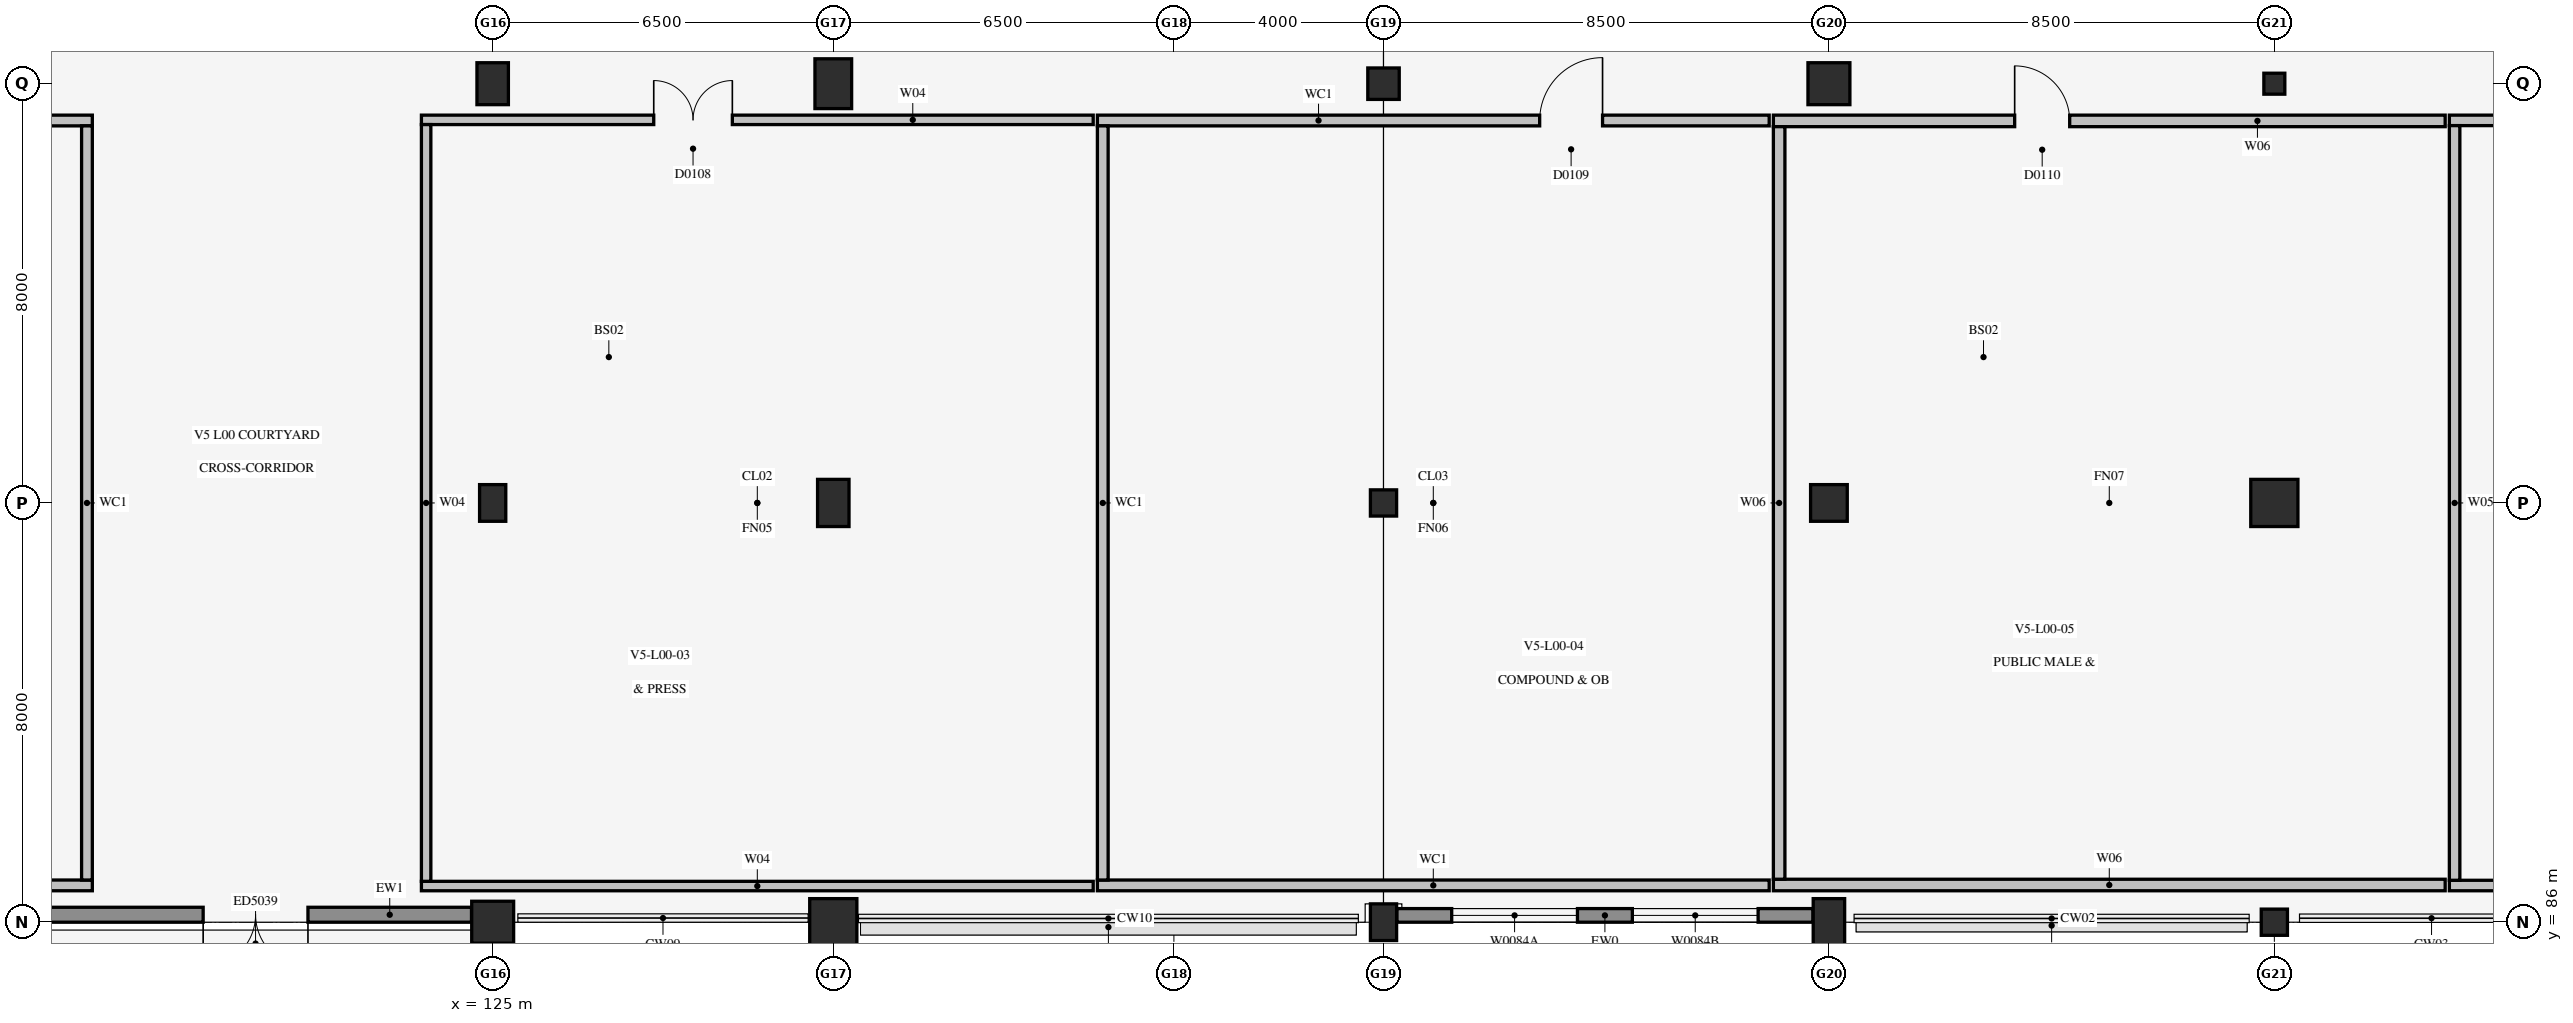
"""IFC4 building model, lengths in metres.
Left out: names, types, materials, properties, quantities, classifications, styles, units other than length and angle.
Written with IfcOpenShell. Run it as: python <this file> out.ifc"""

import sys

from ifc_helpers import new_model, si_unit, direction, frame, frame_2d, origin, origin_2d, place, context, subcontext, project, spatial, rectangle, circle, extrude, element, fill, save


model = new_model("IFC4")
c1 = context("Model", 3, precision=1e-05, world=origin(), true_north=direction((0.0, 1.0)))
c2 = subcontext(c1, "Body", "Model", "MODEL_VIEW")
j1 = project(units=[si_unit("LENGTHUNIT", "METRE"), si_unit("PLANEANGLEUNIT", "RADIAN")], contexts=[c1])
p1 = place(None, origin())
s1 = spatial("IfcSite", under=j1, at=p1, CompositionType="ELEMENT")
p2 = place(p1, origin())
s2 = spatial("IfcBuilding", under=s1, at=p2, CompositionType="ELEMENT")
p3 = place(p2, origin())
s3 = spatial("IfcBuildingStorey", under=s2, at=p3, CompositionType="ELEMENT", Elevation=0.0)
p4 = place(p3, frame((125.0, 86.0, 0.0), z_axis=(0.0, 0.0, 1.0), x_axis=(1.0, 0.0, 0.0)))
e1 = element("IfcColumn", 1, at=p4, inside=s3, PredefinedType="COLUMN", context=c2, shape_type="SweptSolid", body=[
    extrude(rectangle(XDim=0.8, YDim=0.8, at=origin_2d()), origin(), (0.0, 0.0, 1.0), 5.4),
])
p5 = place(p3, frame((125.0, 94.0, 0.0), z_axis=(0.0, 0.0, 1.0), x_axis=(1.0, 0.0, 0.0)))
e2 = element("IfcColumn", 2, at=p5, inside=s3, PredefinedType="COLUMN", context=c2, shape_type="SweptSolid", body=[
    extrude(rectangle(XDim=0.5, YDim=0.7, at=origin_2d()), origin(), (0.0, 0.0, 1.0), 5.4),
])
p6 = place(p3, frame((125.0, 102.0, 0.0), z_axis=(0.0, 0.0, 1.0), x_axis=(1.0, 0.0, 0.0)))
e3 = element("IfcColumn", 3, at=p6, inside=s3, PredefinedType="COLUMN", context=c2, shape_type="SweptSolid", body=[
    extrude(rectangle(XDim=0.6, YDim=0.8, at=origin_2d()), origin(), (0.0, 0.0, 1.0), 5.4),
])
p7 = place(p3, frame((131.5, 86.0, 0.0), z_axis=(0.0, 0.0, 1.0), x_axis=(1.0, 0.0, 0.0)))
e4 = element("IfcColumn", 4, at=p7, inside=s3, PredefinedType="COLUMN", context=c2, shape_type="SweptSolid", body=[
    extrude(rectangle(XDim=0.9, YDim=0.9, at=origin_2d()), origin(), (0.0, 0.0, 1.0), 5.4),
])
p8 = place(p3, frame((131.5, 94.0, 0.0), z_axis=(0.0, 0.0, 1.0), x_axis=(1.0, 0.0, 0.0)))
e5 = element("IfcColumn", 5, at=p8, inside=s3, PredefinedType="COLUMN", context=c2, shape_type="SweptSolid", body=[
    extrude(rectangle(XDim=0.6, YDim=0.9, at=origin_2d()), origin(), (0.0, 0.0, 1.0), 5.4),
])
p9 = place(p3, frame((131.5, 102.0, 0.0), z_axis=(0.0, 0.0, 1.0), x_axis=(1.0, 0.0, 0.0)))
e6 = element("IfcColumn", 6, at=p9, inside=s3, PredefinedType="COLUMN", context=c2, shape_type="SweptSolid", body=[
    extrude(rectangle(XDim=0.7, YDim=0.95, at=origin_2d()), origin(), (0.0, 0.0, 1.0), 5.4),
])
p10 = place(p3, frame((142.0, 86.0, 0.0), z_axis=(0.0, 0.0, 1.0), x_axis=(1.0, 0.0, 0.0)))
e7 = element("IfcColumn", 7, at=p10, inside=s3, PredefinedType="COLUMN", context=c2, shape_type="SweptSolid", body=[
    extrude(rectangle(XDim=0.5, YDim=0.7, at=origin_2d()), origin(), (0.0, 0.0, 1.0), 5.4),
])
p11 = place(p3, frame((142.0, 94.0, 0.0), z_axis=(0.0, 0.0, 1.0), x_axis=(1.0, 0.0, 0.0)))
e8 = element("IfcColumn", 8, at=p11, inside=s3, PredefinedType="COLUMN", context=c2, shape_type="SweptSolid", body=[
    extrude(circle(Radius=0.25, at=origin_2d()), origin(), (0.0, 0.0, 1.0), 5.4),
])
p12 = place(p3, frame((142.0, 102.0, 0.0), z_axis=(0.0, 0.0, 1.0), x_axis=(1.0, 0.0, 0.0)))
e9 = element("IfcColumn", 9, at=p12, inside=s3, PredefinedType="COLUMN", context=c2, shape_type="SweptSolid", body=[
    extrude(circle(Radius=0.3, at=origin_2d()), origin(), (0.0, 0.0, 1.0), 5.4),
])
p13 = place(p3, frame((150.5, 86.0, 0.0), z_axis=(0.0, 0.0, 1.0), x_axis=(1.0, 0.0, 0.0)))
e10 = element("IfcColumn", 10, at=p13, inside=s3, PredefinedType="COLUMN", context=c2, shape_type="SweptSolid", body=[
    extrude(rectangle(XDim=0.6, YDim=0.9, at=origin_2d()), origin(), (0.0, 0.0, 1.0), 5.4),
])
p14 = place(p3, frame((150.5, 94.0, 0.0), z_axis=(0.0, 0.0, 1.0), x_axis=(1.0, 0.0, 0.0)))
e11 = element("IfcColumn", 11, at=p14, inside=s3, PredefinedType="COLUMN", context=c2, shape_type="SweptSolid", body=[
    extrude(circle(Radius=0.35, at=origin_2d()), origin(), (0.0, 0.0, 1.0), 5.4),
])
p15 = place(p3, frame((150.5, 102.0, 0.0), z_axis=(0.0, 0.0, 1.0), x_axis=(1.0, 0.0, 0.0)))
e12 = element("IfcColumn", 12, at=p15, inside=s3, PredefinedType="COLUMN", context=c2, shape_type="SweptSolid", body=[
    extrude(circle(Radius=0.4, at=origin_2d()), origin(), (0.0, 0.0, 1.0), 5.4),
])
p16 = place(p3, frame((159.0, 86.0, 0.0), z_axis=(0.0, 0.0, 1.0), x_axis=(1.0, 0.0, 0.0)))
e13 = element("IfcColumn", 13, at=p16, inside=s3, PredefinedType="COLUMN", context=c2, shape_type="SweptSolid", body=[
    extrude(circle(Radius=0.25, at=origin_2d()), origin(), (0.0, 0.0, 1.0), 5.4),
])
p17 = place(p3, frame((159.0, 94.0, 0.0), z_axis=(0.0, 0.0, 1.0), x_axis=(1.0, 0.0, 0.0)))
e14 = element("IfcColumn", 14, at=p17, inside=s3, PredefinedType="COLUMN", context=c2, shape_type="SweptSolid", body=[
    extrude(circle(Radius=0.45, at=origin_2d()), origin(), (0.0, 0.0, 1.0), 5.4),
])
p18 = place(p3, frame((159.0, 102.0, 0.0), z_axis=(0.0, 0.0, 1.0), x_axis=(1.0, 0.0, 0.0)))
e15 = element("IfcColumn", 15, at=p18, inside=s3, PredefinedType="COLUMN", context=c2, shape_type="SweptSolid", body=[
    extrude(rectangle(XDim=0.4, YDim=0.4, at=origin_2d()), origin(), (0.0, 0.0, 1.0), 5.4),
])
p19 = place(p3, frame((108.14, 86.702, 0.0), z_axis=(0.0, 0.0, 1.0), x_axis=(1.0, 0.0, 0.0)))
e16 = element("IfcWall", 16, at=p19, inside=s3, PredefinedType="SOLIDWALL", context=c2, shape_type="SweptSolid", body=[
    extrude(rectangle(XDim=9.22, YDim=0.205, at=frame_2d((4.61, 0.0))), origin(), (0.0, 0.0, 1.0), 5.125),
])
p20 = place(p3, frame((108.14, 101.298, 0.0), z_axis=(0.0, 0.0, 1.0), x_axis=(1.0, 0.0, 0.0)))
e17 = element("IfcWall", 17, at=p20, inside=s3, PredefinedType="SOLIDWALL", context=c2, shape_type="SweptSolid", body=[
    extrude(rectangle(XDim=9.22, YDim=0.205, at=frame_2d((4.61, 0.0))), origin(), (0.0, 0.0, 1.0), 5.125),
])
p21 = place(p20, frame((3.256, 0.0, 0.0)))
e18 = element("IfcOpeningElement", 18, at=p21, cuts=e17, PredefinedType="OPENING", context=c2, shape_type="SweptSolid", body=[
    extrude(rectangle(XDim=1.0, YDim=2.2, at=frame_2d((0.5, 1.1))), frame((0.0, 0.115, 0.0), z_axis=(0.0, -1.0, 0.0), x_axis=(1.0, 0.0, 0.0)), (0.0, 0.0, 1.0), 0.229),
])
p22 = place(p3, frame((117.258, 86.805, 0.0), z_axis=(0.0, 0.0, 1.0), x_axis=(0.0, 1.0, 0.0)))
e19 = element("IfcWall", 19, at=p22, inside=s3, PredefinedType="SOLIDWALL", context=c2, shape_type="SweptSolid", body=[
    extrude(rectangle(XDim=14.39, YDim=0.205, at=frame_2d((7.195, 0.0))), origin(), (0.0, 0.0, 1.0), 5.125),
])
p23 = place(p3, frame((123.64, 86.69, 0.0), z_axis=(0.0, 0.0, 1.0), x_axis=(1.0, 0.0, 0.0)))
e20 = element("IfcWall", 20, at=p23, inside=s3, PredefinedType="PARTITIONING", context=c2, shape_type="SweptSolid", body=[
    extrude(rectangle(XDim=12.82, YDim=0.18, at=frame_2d((6.41, 0.0))), origin(), (0.0, 0.0, 1.0), 5.125),
])
p24 = place(p3, frame((123.64, 101.31, 0.0), z_axis=(0.0, 0.0, 1.0), x_axis=(1.0, 0.0, 0.0)))
e21 = element("IfcWall", 21, at=p24, inside=s3, PredefinedType="PARTITIONING", context=c2, shape_type="SweptSolid", body=[
    extrude(rectangle(XDim=12.82, YDim=0.18, at=frame_2d((6.41, 0.0))), origin(), (0.0, 0.0, 1.0), 5.125),
])
p25 = place(p24, frame((4.434, 0.0, 0.0)))
e22 = element("IfcOpeningElement", 22, at=p25, cuts=e21, PredefinedType="OPENING", context=c2, shape_type="SweptSolid", body=[
    extrude(rectangle(XDim=1.5, YDim=2.3, at=frame_2d((0.75, 1.15))), frame((0.0, 0.102, 0.0), z_axis=(0.0, -1.0, 0.0), x_axis=(1.0, 0.0, 0.0)), (0.0, 0.0, 1.0), 0.204),
])
p26 = place(p3, frame((123.73, 86.78, 0.0), z_axis=(0.0, 0.0, 1.0), x_axis=(0.0, 1.0, 0.0)))
e23 = element("IfcWall", 23, at=p26, inside=s3, PredefinedType="PARTITIONING", context=c2, shape_type="SweptSolid", body=[
    extrude(rectangle(XDim=14.44, YDim=0.18, at=frame_2d((7.22, 0.0))), origin(), (0.0, 0.0, 1.0), 5.125),
])
p27 = place(p3, frame((136.54, 86.702, 0.0), z_axis=(0.0, 0.0, 1.0), x_axis=(1.0, 0.0, 0.0)))
e24 = element("IfcWall", 24, at=p27, inside=s3, PredefinedType="SOLIDWALL", context=c2, shape_type="SweptSolid", body=[
    extrude(rectangle(XDim=12.82, YDim=0.205, at=frame_2d((6.41, 0.0))), origin(), (0.0, 0.0, 1.0), 5.125),
])
p28 = place(p3, frame((136.54, 101.298, 0.0), z_axis=(0.0, 0.0, 1.0), x_axis=(1.0, 0.0, 0.0)))
e25 = element("IfcWall", 25, at=p28, inside=s3, PredefinedType="SOLIDWALL", context=c2, shape_type="SweptSolid", body=[
    extrude(rectangle(XDim=12.82, YDim=0.205, at=frame_2d((6.41, 0.0))), origin(), (0.0, 0.0, 1.0), 5.125),
])
p29 = place(p28, frame((8.44, 0.0, 0.0)))
e26 = element("IfcOpeningElement", 26, at=p29, cuts=e25, PredefinedType="OPENING", context=c2, shape_type="SweptSolid", body=[
    extrude(rectangle(XDim=1.2, YDim=2.2, at=frame_2d((0.6, 1.1))), frame((0.0, 0.115, 0.0), z_axis=(0.0, -1.0, 0.0), x_axis=(1.0, 0.0, 0.0)), (0.0, 0.0, 1.0), 0.229),
])
p30 = place(p3, frame((136.643, 86.805, 0.0), z_axis=(0.0, 0.0, 1.0), x_axis=(0.0, 1.0, 0.0)))
e27 = element("IfcWall", 27, at=p30, inside=s3, PredefinedType="SOLIDWALL", context=c2, shape_type="SweptSolid", body=[
    extrude(rectangle(XDim=14.39, YDim=0.205, at=frame_2d((7.195, 0.0))), origin(), (0.0, 0.0, 1.0), 5.125),
])
p31 = place(p3, frame((149.44, 86.71, 0.0), z_axis=(0.0, 0.0, 1.0), x_axis=(1.0, 0.0, 0.0)))
e28 = element("IfcWall", 28, at=p31, inside=s3, PredefinedType="PLUMBINGWALL", context=c2, shape_type="SweptSolid", body=[
    extrude(rectangle(XDim=12.82, YDim=0.22, at=frame_2d((6.41, 0.0))), origin(), (0.0, 0.0, 1.0), 5.125),
])
p32 = place(p3, frame((149.44, 101.29, 0.0), z_axis=(0.0, 0.0, 1.0), x_axis=(1.0, 0.0, 0.0)))
e29 = element("IfcWall", 29, at=p32, inside=s3, PredefinedType="PLUMBINGWALL", context=c2, shape_type="SweptSolid", body=[
    extrude(rectangle(XDim=12.82, YDim=0.22, at=frame_2d((6.41, 0.0))), origin(), (0.0, 0.0, 1.0), 5.125),
])
p33 = place(p32, frame((4.604, 0.0, 0.0)))
e30 = element("IfcOpeningElement", 30, at=p33, cuts=e29, PredefinedType="OPENING", context=c2, shape_type="SweptSolid", body=[
    extrude(rectangle(XDim=1.05, YDim=2.15, at=frame_2d((0.525, 1.075))), frame((0.0, 0.122, 0.0), z_axis=(0.0, -1.0, 0.0), x_axis=(1.0, 0.0, 0.0)), (0.0, 0.0, 1.0), 0.244),
])
p34 = place(p3, frame((149.55, 86.82, 0.0), z_axis=(0.0, 0.0, 1.0), x_axis=(0.0, 1.0, 0.0)))
e31 = element("IfcWall", 31, at=p34, inside=s3, PredefinedType="PLUMBINGWALL", context=c2, shape_type="SweptSolid", body=[
    extrude(rectangle(XDim=14.36, YDim=0.22, at=frame_2d((7.18, 0.0))), origin(), (0.0, 0.0, 1.0), 5.125),
])
p35 = place(p3, frame((162.34, 86.7, 0.0), z_axis=(0.0, 0.0, 1.0), x_axis=(1.0, 0.0, 0.0)))
e32 = element("IfcWall", 32, at=p35, inside=s3, PredefinedType="PLUMBINGWALL", context=c2, shape_type="SweptSolid", body=[
    extrude(rectangle(XDim=12.82, YDim=0.2, at=frame_2d((6.41, 0.0))), origin(), (0.0, 0.0, 1.0), 5.125),
])
p36 = place(p3, frame((162.34, 101.3, 0.0), z_axis=(0.0, 0.0, 1.0), x_axis=(1.0, 0.0, 0.0)))
e33 = element("IfcWall", 33, at=p36, inside=s3, PredefinedType="PLUMBINGWALL", context=c2, shape_type="SweptSolid", body=[
    extrude(rectangle(XDim=12.82, YDim=0.2, at=frame_2d((6.41, 0.0))), origin(), (0.0, 0.0, 1.0), 5.125),
])
p37 = place(p36, frame((7.258, 0.0, 0.0)))
e34 = element("IfcOpeningElement", 34, at=p37, cuts=e33, PredefinedType="OPENING", context=c2, shape_type="SweptSolid", body=[
    extrude(rectangle(XDim=0.9, YDim=2.1, at=frame_2d((0.45, 1.05))), frame((0.0, 0.112, 0.0), z_axis=(0.0, -1.0, 0.0), x_axis=(1.0, 0.0, 0.0)), (0.0, 0.0, 1.0), 0.224),
])
p38 = place(p3, frame((162.44, 86.8, 0.0), z_axis=(0.0, 0.0, 1.0), x_axis=(0.0, 1.0, 0.0)))
e35 = element("IfcWall", 35, at=p38, inside=s3, PredefinedType="PLUMBINGWALL", context=c2, shape_type="SweptSolid", body=[
    extrude(rectangle(XDim=14.4, YDim=0.2, at=frame_2d((7.2, 0.0))), origin(), (0.0, 0.0, 1.0), 5.125),
])
p39 = place(p3, frame((116.354, 86.143, 0.0), z_axis=(0.0, 0.0, 1.0), x_axis=(1.0, 0.0, 0.0)))
e36 = element("IfcWall", 36, at=p39, inside=s3, PredefinedType="SOLIDWALL", context=c2, shape_type="SweptSolid", body=[
    extrude(rectangle(XDim=8.242, YDim=0.285, at=frame_2d((4.121, 0.0))), origin(), (0.0, 0.0, 1.0), 4.498),
])
p40 = place(p39, frame((3.121, 0.0, 0.0)))
e37 = element("IfcOpeningElement", 37, at=p40, cuts=e36, PredefinedType="OPENING", context=c2, shape_type="SweptSolid", body=[
    extrude(rectangle(XDim=2.0, YDim=2.4, at=frame_2d((1.0, 1.2))), frame((0.0, 0.154, 0.0), z_axis=(0.0, -1.0, 0.0), x_axis=(1.0, 0.0, 0.0)), (0.0, 0.0, 1.0), 0.309),
])
p41 = place(p3, frame((142.254, 86.13, 0.0), z_axis=(0.0, 0.0, 1.0), x_axis=(1.0, 0.0, 0.0)))
e38 = element("IfcWall", 38, at=p41, inside=s3, PredefinedType="SOLIDWALL", context=c2, shape_type="SweptSolid", body=[
    extrude(rectangle(XDim=7.942, YDim=0.26, at=frame_2d((3.971, 0.0))), origin(), (0.0, 0.0, 1.0), 4.574),
])
p42 = place(p41, frame((1.047, 0.0, 0.95)))
e39 = element("IfcOpeningElement", 39, at=p42, cuts=e38, PredefinedType="OPENING", context=c2, shape_type="SweptSolid", body=[
    extrude(rectangle(XDim=2.4, YDim=1.8, at=frame_2d((1.2, 0.9))), frame((0.0, 0.142, 0.0), z_axis=(0.0, -1.0, 0.0), x_axis=(1.0, 0.0, 0.0)), (0.0, 0.0, 1.0), 0.284),
])
p43 = place(p41, frame((4.495, 0.0, 0.95)))
e40 = element("IfcOpeningElement", 40, at=p43, cuts=e38, PredefinedType="OPENING", context=c2, shape_type="SweptSolid", body=[
    extrude(rectangle(XDim=2.4, YDim=1.8, at=frame_2d((1.2, 0.9))), frame((0.0, 0.142, 0.0), z_axis=(0.0, -1.0, 0.0), x_axis=(1.0, 0.0, 0.0)), (0.0, 0.0, 1.0), 0.284),
])
p44 = place(p25, frame((1.5, 0.0, 0.0), z_axis=(0.0, 0.0, 1.0), x_axis=(-1.0, 0.0, 0.0)))
e41 = element("IfcDoor", 41, at=p44, inside=s3, OperationType="DOUBLE_DOOR_SINGLE_SWING", PredefinedType="DOOR", context=c2, shape_type="SweptSolid", body=[
    extrude(rectangle(XDim=1.5, YDim=2.3, at=frame_2d((0.75, 1.15))), frame((0.0, 0.025, 0.0), z_axis=(0.0, -1.0, 0.0), x_axis=(1.0, 0.0, 0.0)), (0.0, 0.0, 1.0), 0.05),
])
fill(e22, e41)
p45 = place(p29, frame((1.2, 0.0, 0.0), z_axis=(0.0, 0.0, 1.0), x_axis=(-1.0, 0.0, 0.0)))
e42 = element("IfcDoor", 42, at=p45, inside=s3, OperationType="SINGLE_SWING_RIGHT", PredefinedType="DOOR", context=c2, shape_type="SweptSolid", body=[
    extrude(rectangle(XDim=1.2, YDim=2.2, at=frame_2d((0.6, 1.1))), frame((0.0, 0.025, 0.0), z_axis=(0.0, -1.0, 0.0), x_axis=(1.0, 0.0, 0.0)), (0.0, 0.0, 1.0), 0.05),
])
fill(e26, e42)
p46 = place(p33, frame((1.05, 0.0, 0.0), z_axis=(0.0, 0.0, 1.0), x_axis=(-1.0, 0.0, 0.0)))
e43 = element("IfcDoor", 43, at=p46, inside=s3, OperationType="SINGLE_SWING_LEFT", PredefinedType="DOOR", context=c2, shape_type="SweptSolid", body=[
    extrude(rectangle(XDim=1.05, YDim=2.15, at=frame_2d((0.525, 1.075))), frame((0.0, 0.025, 0.0), z_axis=(0.0, -1.0, 0.0), x_axis=(1.0, 0.0, 0.0)), (0.0, 0.0, 1.0), 0.05),
])
fill(e30, e43)
p47 = place(p40, frame((2.0, 0.0, 0.0), z_axis=(0.0, 0.0, 1.0), x_axis=(-1.0, 0.0, 0.0)))
e44 = element("IfcDoor", 44, at=p47, inside=s3, OperationType="DOUBLE_DOOR_SINGLE_SWING", PredefinedType="DOOR", context=c2, shape_type="SweptSolid", body=[
    extrude(rectangle(XDim=2.0, YDim=2.4, at=frame_2d((1.0, 1.2))), frame((0.0, 0.025, 0.0), z_axis=(0.0, -1.0, 0.0), x_axis=(1.0, 0.0, 0.0)), (0.0, 0.0, 1.0), 0.05),
])
fill(e37, e44)
p48 = place(p42, origin())
e45 = element("IfcWindow", 45, at=p48, inside=s3, PartitioningType="SINGLE_PANEL", PredefinedType="WINDOW", context=c2, shape_type="SweptSolid", body=[
    extrude(rectangle(XDim=2.4, YDim=1.8, at=frame_2d((1.2, 0.9))), frame((0.0, 0.03, 0.0), z_axis=(0.0, -1.0, 0.0), x_axis=(1.0, 0.0, 0.0)), (0.0, 0.0, 1.0), 0.06),
])
fill(e39, e45)
p49 = place(p43, origin())
e46 = element("IfcWindow", 46, at=p49, inside=s3, PartitioningType="SINGLE_PANEL", PredefinedType="WINDOW", context=c2, shape_type="SweptSolid", body=[
    extrude(rectangle(XDim=2.4, YDim=1.8, at=frame_2d((1.2, 0.9))), frame((0.0, 0.03, 0.0), z_axis=(0.0, -1.0, 0.0), x_axis=(1.0, 0.0, 0.0)), (0.0, 0.0, 1.0), 0.06),
])
fill(e40, e46)
save(model, sys.argv[1])
